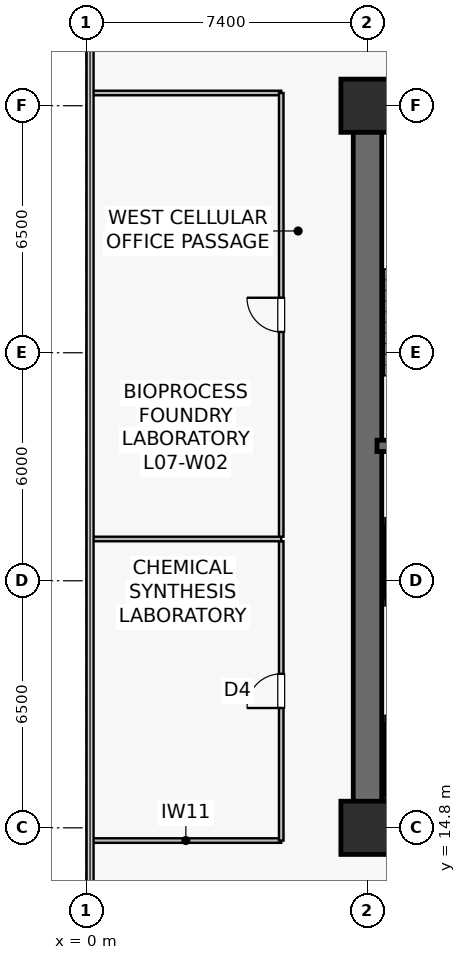
"""IFC4 building model, lengths in metres.
Left out: names, types, materials, properties, quantities, classifications, styles, units other than length and angle.
Written with IfcOpenShell. Run it as: python <this file> out.ifc"""

import sys

from ifc_helpers import new_model, si_unit, direction, frame, frame_2d, origin, origin_2d, place, context, subcontext, project, spatial, rectangle, extrude, source, transform, mapped, element, fill, save


model = new_model("IFC4")
c1 = context("Model", 3, precision=1e-05, world=origin(), true_north=direction((0.0, 1.0)))
c2 = subcontext(c1, "Body", "Model", "MODEL_VIEW")
j1 = project(units=[si_unit("LENGTHUNIT", "METRE"), si_unit("PLANEANGLEUNIT", "RADIAN")], contexts=[c1])
p1 = place(None, origin())
s1 = spatial("IfcSite", under=j1, at=p1, CompositionType="ELEMENT")
p2 = place(p1, origin())
s2 = spatial("IfcBuilding", under=s1, at=p2, CompositionType="ELEMENT")
p3 = place(p2, frame((0.0, 0.0, 29.3)))
s3 = spatial("IfcBuildingStorey", under=s2, at=p3, CompositionType="ELEMENT", Elevation=29.3)
p4 = place(p3, frame((7.025, 14.8, 0.0), z_axis=(0.0, 0.0, 1.0), x_axis=(1.0, 0.0, 0.0)))
e1 = element("IfcWall", 1, at=p4, inside=s3, PredefinedType="SHEAR", context=c2, shape_type="SweptSolid", body=[
    extrude(rectangle(XDim=15.55, YDim=0.75, at=frame_2d((7.775, 0.0))), origin(), (0.0, 0.0, 1.0), 3.78),
])
p5 = place(p3, frame((7.025, 33.8, 0.0), z_axis=(0.0, 0.0, 1.0), x_axis=(1.0, 0.0, 0.0)))
e2 = element("IfcWall", 2, at=p5, inside=s3, PredefinedType="SHEAR", context=c2, shape_type="SweptSolid", body=[
    extrude(rectangle(XDim=15.55, YDim=0.75, at=frame_2d((7.775, 0.0))), origin(), (0.0, 0.0, 1.0), 3.78),
])
p6 = place(p5, frame((5.725, 0.0, 0.0)))
e3 = element("IfcOpeningElement", 3, at=p6, cuts=e2, PredefinedType="OPENING", context=c2, shape_type="SweptSolid", body=[
    extrude(rectangle(XDim=0.95, YDim=2.15, at=frame_2d((0.475, 1.075))), frame((0.0, 0.385, 0.0), z_axis=(0.0, -1.0, 0.0), x_axis=(1.0, 0.0, 0.0)), (0.0, 0.0, 1.0), 0.77),
])
p7 = place(p5, frame((9.09, 0.0, 0.0)))
e4 = element("IfcOpeningElement", 4, at=p7, cuts=e2, PredefinedType="OPENING", context=c2, shape_type="SweptSolid", body=[
    extrude(rectangle(XDim=0.95, YDim=2.15, at=frame_2d((0.475, 1.075))), frame((0.0, 0.385, 0.0), z_axis=(0.0, -1.0, 0.0), x_axis=(1.0, 0.0, 0.0)), (0.0, 0.0, 1.0), 0.77),
])
p8 = place(p5, frame((12.49, 0.0, 0.0)))
e5 = element("IfcOpeningElement", 5, at=p8, cuts=e2, PredefinedType="OPENING", context=c2, shape_type="SweptSolid", body=[
    extrude(rectangle(XDim=0.95, YDim=2.15, at=frame_2d((0.475, 1.075))), frame((0.0, 0.385, 0.0), z_axis=(0.0, -1.0, 0.0), x_axis=(1.0, 0.0, 0.0)), (0.0, 0.0, 1.0), 0.77),
])
p9 = place(p3, frame((7.4, 15.175, 0.0), z_axis=(0.0, 0.0, 1.0), x_axis=(0.0, 1.0, 0.0)))
e6 = element("IfcWall", 6, at=p9, inside=s3, PredefinedType="SHEAR", context=c2, shape_type="SweptSolid", body=[
    extrude(rectangle(XDim=18.25, YDim=0.75, at=frame_2d((9.125, 0.0))), origin(), (0.0, 0.0, 1.0), 3.78),
])
p10 = place(p3, frame((7.65, 24.85, 0.0), z_axis=(0.0, 0.0, 1.0), x_axis=(1.0, 0.0, 0.0)))
e7 = element("IfcWall", 7, at=p10, inside=s3, PredefinedType="SHEAR", context=c2, shape_type="SweptSolid", body=[
    extrude(rectangle(XDim=3.8, YDim=0.3, at=frame_2d((1.9, 0.0))), origin(), (0.0, 0.0, 1.0), 3.78),
])
p11 = place(p3, frame((7.73, 33.4, 0.0), z_axis=(0.0, 0.0, 1.0), x_axis=(1.0, 0.0, 0.0)))
e8 = element("IfcWall", 8, at=p11, inside=s3, PredefinedType="SOLIDWALL", context=c2, shape_type="SweptSolid", body=[
    extrude(rectangle(XDim=3.72, YDim=0.12, at=frame_2d((1.86, 0.0))), origin(), (0.0, 0.0, 1.0), 3.78),
])
m1 = source(origin(), c2, "Body", "SweptSolid", [
    extrude(rectangle(XDim=1.4, YDim=1.4, at=origin_2d()), origin(), (0.0, 0.0, 1.0), 4.1),
])
for number, where, z_axis, x_axis in (
    (9, (7.4, 14.8, 0.0), (0.0, 0.0, 1.0), (1.0, 0.0, 0.0)),
    (10, (7.4, 33.8, 0.0), (0.0, 0.0, 1.0), (1.0, 0.0, 0.0)),
):
    element("IfcColumn", number, at=place(p3, frame(where, z_axis=z_axis, x_axis=x_axis)), inside=s3, PredefinedType="COLUMN", context=c2, shape_type="MappedRepresentation", body=[
        mapped(m1, transform((0.0, 0.0, 0.0), scale=1.0)),
    ])
p12 = place(p3, frame((7.87, 17.65, 0.0), z_axis=(0.0, 0.0, 1.0), x_axis=(1.0, 0.0, 0.0)))
e11 = element("IfcWall", 11, at=p12, inside=s3, PredefinedType="SOLIDWALL", context=c2, shape_type="SweptSolid", body=[
    extrude(rectangle(XDim=2.26, YDim=0.2, at=frame_2d((1.13, 0.0))), origin(), (0.0, 0.0, 1.0), 3.78),
])
p13 = place(p12, frame((0.58, 0.0, 0.0)))
e12 = element("IfcOpeningElement", 12, at=p13, cuts=e11, PredefinedType="OPENING", context=c2, shape_type="SweptSolid", body=[
    extrude(rectangle(XDim=1.1, YDim=2.22, at=frame_2d((0.55, 1.11))), frame((0.0, 0.11, 0.0), z_axis=(0.0, -1.0, 0.0), x_axis=(1.0, 0.0, 0.0)), (0.0, 0.0, 1.0), 0.22),
])
p14 = place(p3, frame((7.87, 15.55, 0.0), z_axis=(0.0, 0.0, 1.0), x_axis=(1.0, 0.0, 0.0)))
e13 = element("IfcWall", 13, at=p14, inside=s3, PredefinedType="SOLIDWALL", context=c2, shape_type="SweptSolid", body=[
    extrude(rectangle(XDim=2.26, YDim=0.2, at=frame_2d((1.13, 0.0))), origin(), (0.0, 0.0, 1.0), 3.78),
])
p15 = place(p3, frame((7.95, 15.65, 0.0), z_axis=(0.0, 0.0, 1.0), x_axis=(0.0, 1.0, 0.0)))
e14 = element("IfcWall", 14, at=p15, inside=s3, PredefinedType="SOLIDWALL", context=c2, shape_type="SweptSolid", body=[
    extrude(rectangle(XDim=1.9, YDim=0.18, at=frame_2d((0.95, 0.0))), origin(), (0.0, 0.0, 1.0), 3.78),
])
for number, where, z_axis, x_axis in (
    (15, (7.87, 20.75, 0.0), (0.0, 0.0, 1.0), (1.0, 0.0, 0.0)),
    (16, (7.87, 22.85, 0.0), (0.0, 0.0, 1.0), (1.0, 0.0, 0.0)),
):
    element("IfcWall", number, at=place(p3, frame(where, z_axis=z_axis, x_axis=x_axis)), inside=s3, PredefinedType="SOLIDWALL", context=c2, shape_type="SweptSolid", body=[
        extrude(rectangle(XDim=2.26, YDim=0.2, at=frame_2d((1.13, 0.0))), origin(), (0.0, 0.0, 1.0), 3.78),
    ])
p16 = place(p3, frame((7.95, 20.85, 0.0), z_axis=(0.0, 0.0, 1.0), x_axis=(0.0, 1.0, 0.0)))
e17 = element("IfcWall", 17, at=p16, inside=s3, PredefinedType="SOLIDWALL", context=c2, shape_type="SweptSolid", body=[
    extrude(rectangle(XDim=1.9, YDim=0.18, at=frame_2d((0.95, 0.0))), origin(), (0.0, 0.0, 1.0), 3.78),
])
for number, where, z_axis, x_axis in (
    (18, (0.11, 14.465, 0.0), (0.0, 0.0, 1.0), (1.0, 0.0, 0.0)),
    (19, (0.11, 34.135, 0.0), (0.0, 0.0, 1.0), (1.0, 0.0, 0.0)),
):
    element("IfcWall", number, at=place(p3, frame(where, z_axis=z_axis, x_axis=x_axis)), inside=s3, PredefinedType="PARTITIONING", context=c2, shape_type="SweptSolid", body=[
        extrude(rectangle(XDim=5.02, YDim=0.12, at=frame_2d((2.51, 0.0))), origin(), (0.0, 0.0, 1.0), 3.78),
    ])
p17 = place(p3, frame((5.13, 14.465, 0.0), z_axis=(0.0, 0.0, 1.0), x_axis=(0.0, 1.0, 0.0)))
e20 = element("IfcWall", 20, at=p17, inside=s3, PredefinedType="PARTITIONING", context=c2, shape_type="SweptSolid", body=[
    extrude(rectangle(XDim=7.875, YDim=0.12, at=frame_2d((3.938, 0.0))), origin(), (0.0, 0.0, 1.0), 3.78),
])
p18 = place(p17, frame((3.488, 0.0, 0.0)))
e21 = element("IfcOpeningElement", 21, at=p18, cuts=e20, PredefinedType="OPENING", context=c2, shape_type="SweptSolid", body=[
    extrude(rectangle(XDim=0.9, YDim=2.1, at=frame_2d((0.45, 1.05))), frame((0.0, 0.07, 0.0), z_axis=(0.0, -1.0, 0.0), x_axis=(1.0, 0.0, 0.0)), (0.0, 0.0, 1.0), 0.14),
])
p19 = place(p3, frame((0.11, 22.4, 0.0), z_axis=(0.0, 0.0, 1.0), x_axis=(1.0, 0.0, 0.0)))
e22 = element("IfcWall", 22, at=p19, inside=s3, PredefinedType="PARTITIONING", context=c2, shape_type="SweptSolid", body=[
    extrude(rectangle(XDim=5.02, YDim=0.12, at=frame_2d((2.51, 0.0))), origin(), (0.0, 0.0, 1.0), 3.78),
])
p20 = place(p3, frame((5.13, 22.46, 0.0), z_axis=(0.0, 0.0, 1.0), x_axis=(0.0, 1.0, 0.0)))
e23 = element("IfcWall", 23, at=p20, inside=s3, PredefinedType="PARTITIONING", context=c2, shape_type="SweptSolid", body=[
    extrude(rectangle(XDim=11.675, YDim=0.12, at=frame_2d((5.837, 0.0))), origin(), (0.0, 0.0, 1.0), 3.78),
])
p21 = place(p20, frame((5.387, 0.0, 0.0)))
e24 = element("IfcOpeningElement", 24, at=p21, cuts=e23, PredefinedType="OPENING", context=c2, shape_type="SweptSolid", body=[
    extrude(rectangle(XDim=0.9, YDim=2.1, at=frame_2d((0.45, 1.05))), frame((0.0, 0.07, 0.0), z_axis=(0.0, -1.0, 0.0), x_axis=(1.0, 0.0, 0.0)), (0.0, 0.0, 1.0), 0.14),
])
m2 = source(origin(), c2, "Body", "SweptSolid", [
    extrude(rectangle(XDim=0.9, YDim=2.1, at=frame_2d((0.45, 1.05))), frame((0.0, 0.025, 0.0), z_axis=(0.0, -1.0, 0.0), x_axis=(1.0, 0.0, 0.0)), (0.0, 0.0, 1.0), 0.05),
])
p22 = place(p18, origin())
e25 = element("IfcDoor", 25, at=p22, inside=s3, OperationType="SINGLE_SWING_LEFT", PredefinedType="DOOR", context=c2, shape_type="MappedRepresentation", body=[
    mapped(m2, transform((0.0, 0.0, 0.0), scale=1.0)),
])
fill(e21, e25)
p23 = place(p21, origin())
e26 = element("IfcDoor", 26, at=p23, inside=s3, OperationType="SINGLE_SWING_RIGHT", PredefinedType="DOOR", context=c2, shape_type="MappedRepresentation", body=[
    mapped(m2, transform((0.0, 0.0, 0.0), scale=1.0)),
])
fill(e24, e26)
save(model, sys.argv[1])
